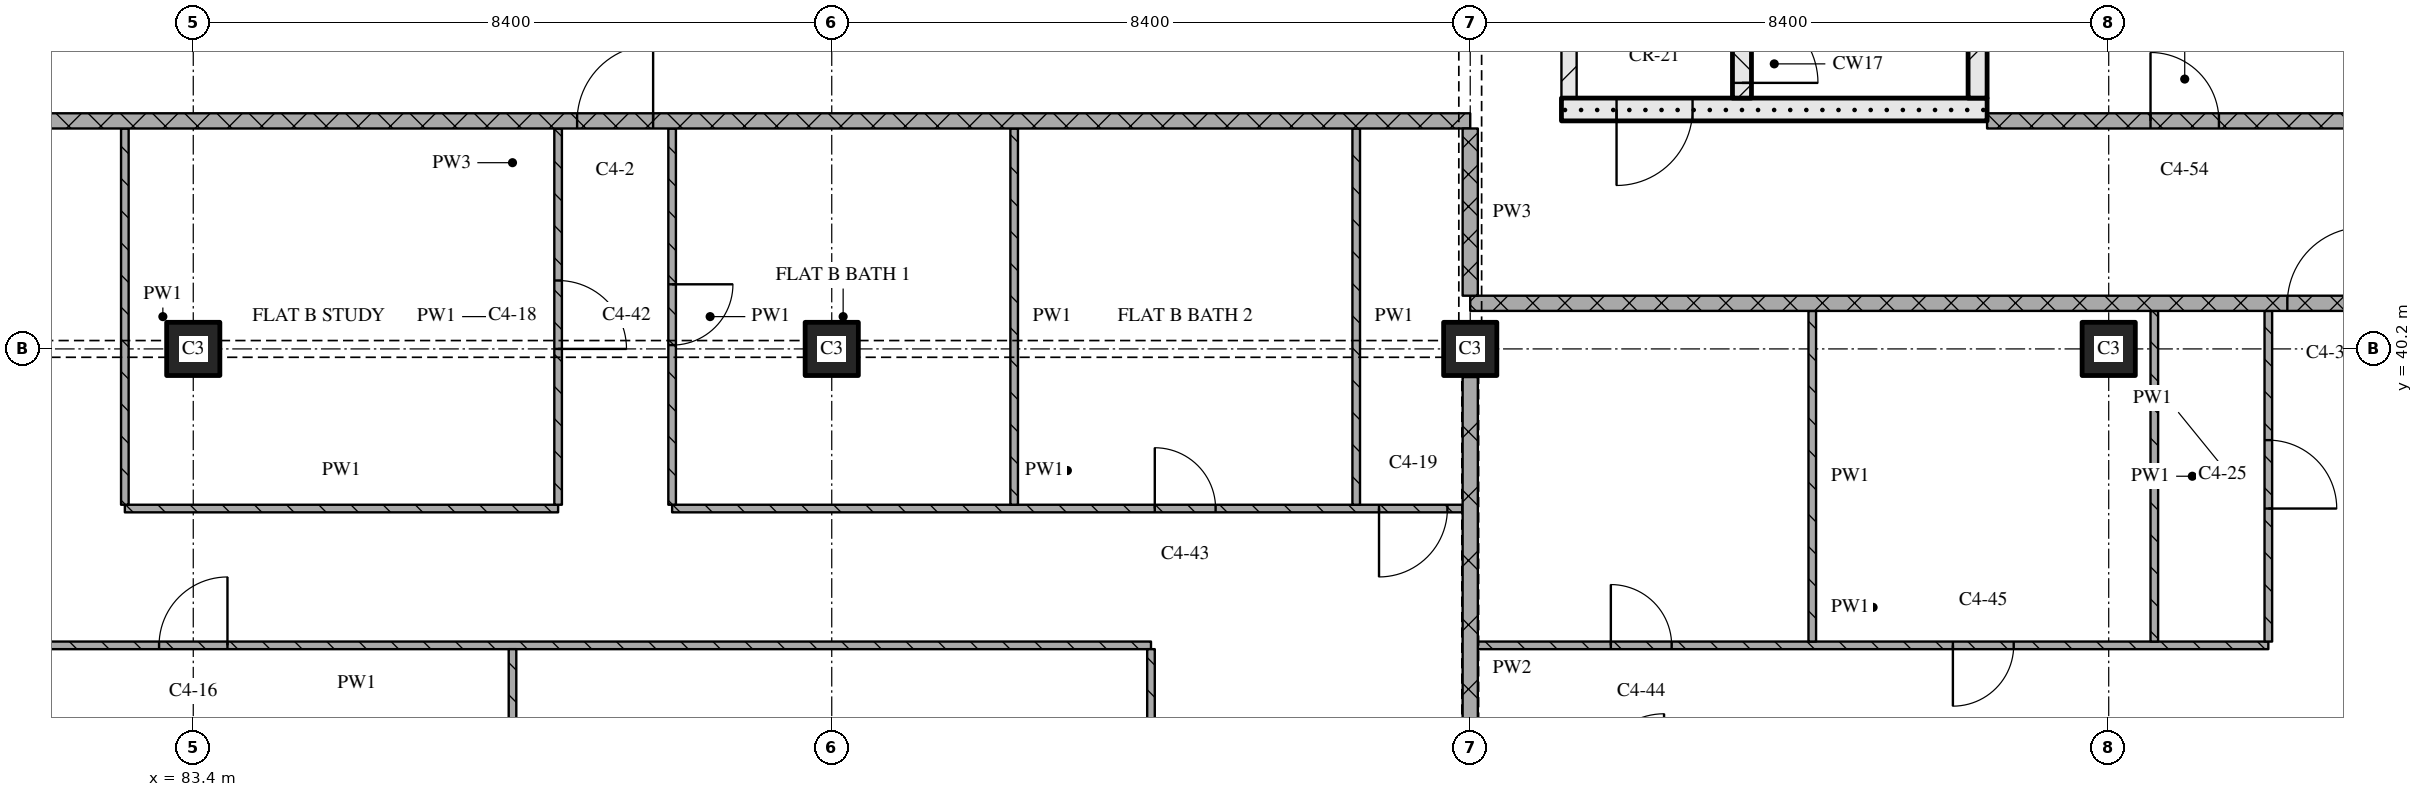
"""IFC4 building model, lengths in metres.
Left out: names, types, materials, properties, quantities, classifications, styles, units other than length and angle.
Written with IfcOpenShell. Run it as: python <this file> out.ifc"""

import sys

from ifc_helpers import new_model, si_unit, direction, frame, frame_2d, origin, origin_2d, place, context, subcontext, project, spatial, rectangle, extrude, element, fill, save


model = new_model("IFC4")
c1 = context("Model", 3, precision=1e-05, world=origin(), true_north=direction((0.0, 1.0)))
c2 = subcontext(c1, "Body", "Model", "MODEL_VIEW")
j1 = project(units=[si_unit("LENGTHUNIT", "METRE"), si_unit("PLANEANGLEUNIT", "RADIAN")], contexts=[c1])
p1 = place(None, origin())
s1 = spatial("IfcSite", under=j1, at=p1, CompositionType="ELEMENT")
p2 = place(p1, origin())
s2 = spatial("IfcBuilding", under=s1, at=p2, CompositionType="ELEMENT")
p3 = place(p2, frame((0.0, 0.0, 187.05)))
s3 = spatial("IfcBuildingStorey", under=s2, at=p3, CompositionType="ELEMENT", Elevation=187.05)
for number, where, z_axis, x_axis in (
    (1, (83.4, 40.2, 0.0), (0.0, 0.0, 1.0), (1.0, 0.0, 0.0)),
    (2, (91.8, 40.2, 0.0), (0.0, 0.0, 1.0), (1.0, 0.0, 0.0)),
    (3, (100.2, 40.2, 0.0), (0.0, 0.0, 1.0), (1.0, 0.0, 0.0)),
    (4, (108.6, 40.2, 0.0), (0.0, 0.0, 1.0), (1.0, 0.0, 0.0)),
):
    element("IfcColumn", number, at=place(p3, frame(where, z_axis=z_axis, x_axis=x_axis)), inside=s3, PredefinedType="COLUMN", context=c2, shape_type="SweptSolid", body=[
        extrude(rectangle(XDim=0.7, YDim=0.7, at=origin_2d()), origin(), (0.0, 0.0, 1.0), 3.6),
    ])
p4 = place(p3, frame((101.4, 43.35, 0.0), z_axis=(0.0, 0.0, 1.0), x_axis=(1.0, 0.0, 0.0)))
e5 = element("IfcWall", 5, at=p4, inside=s3, PredefinedType="SOLIDWALL", context=c2, shape_type="SweptSolid", body=[
    extrude(rectangle(XDim=5.6, YDim=0.3, at=frame_2d((2.8, 0.0))), origin(), (0.0, 0.0, 1.0), 3.32),
])
p5 = place(p4, frame((0.725, 0.0, 0.0)))
e6 = element("IfcOpeningElement", 6, at=p5, cuts=e5, PredefinedType="OPENING", context=c2, shape_type="SweptSolid", body=[
    extrude(rectangle(XDim=1.0, YDim=2.1, at=frame_2d((0.5, 1.05))), frame((0.0, 0.16, 0.0), z_axis=(0.0, -1.0, 0.0), x_axis=(1.0, 0.0, 0.0)), (0.0, 0.0, 1.0), 0.32),
])
p6 = place(p3, frame((101.5, 43.5, 0.0), z_axis=(0.0, 0.0, 1.0), x_axis=(0.0, 1.0, 0.0)))
e7 = element("IfcWall", 7, at=p6, inside=s3, PredefinedType="PARTITIONING", context=c2, shape_type="SweptSolid", body=[
    extrude(rectangle(XDim=6.9, YDim=0.2, at=frame_2d((3.45, 0.0))), origin(), (0.0, 0.0, 1.0), 3.32),
])
p7 = place(p6, frame((1.0, 0.0, 0.0)))
e8 = element("IfcOpeningElement", 8, at=p7, cuts=e7, PredefinedType="OPENING", context=c2, shape_type="SweptSolid", body=[
    extrude(rectangle(XDim=1.0, YDim=2.1, at=frame_2d((0.5, 1.05))), frame((0.0, 0.11, 0.0), z_axis=(0.0, -1.0, 0.0), x_axis=(1.0, 0.0, 0.0)), (0.0, 0.0, 1.0), 0.22),
])
p8 = place(p3, frame((103.775, 43.5, 0.0), z_axis=(0.0, 0.0, 1.0), x_axis=(0.0, 1.0, 0.0)))
e9 = element("IfcWall", 9, at=p8, inside=s3, PredefinedType="SOLIDWALL", context=c2, shape_type="SweptSolid", body=[
    extrude(rectangle(XDim=6.9, YDim=0.25, at=frame_2d((3.45, 0.0))), origin(), (0.0, 0.0, 1.0), 3.32),
])
p9 = place(p8, frame((0.2, 0.0, 0.0)))
e10 = element("IfcOpeningElement", 10, at=p9, cuts=e9, PredefinedType="OPENING", context=c2, shape_type="SweptSolid", body=[
    extrude(rectangle(XDim=1.0, YDim=2.1, at=frame_2d((0.5, 1.05))), frame((0.0, 0.135, 0.0), z_axis=(0.0, -1.0, 0.0), x_axis=(1.0, 0.0, 0.0)), (0.0, 0.0, 1.0), 0.27),
])
p10 = place(p3, frame((106.875, 43.5, 0.0), z_axis=(0.0, 0.0, 1.0), x_axis=(0.0, 1.0, 0.0)))
e11 = element("IfcWall", 11, at=p10, inside=s3, PredefinedType="SOLIDWALL", context=c2, shape_type="SweptSolid", body=[
    extrude(rectangle(XDim=6.9, YDim=0.25, at=frame_2d((3.45, 0.0))), origin(), (0.0, 0.0, 1.0), 3.32),
])
p11 = place(p3, frame((96.0, 36.3, 0.0), z_axis=(0.0, 0.0, 1.0), x_axis=(-1.0, 0.0, 0.0)))
e12 = element("IfcWall", 12, at=p11, inside=s3, PredefinedType="PARTITIONING", context=c2, shape_type="SweptSolid", body=[
    extrude(rectangle(XDim=20.9, YDim=0.1, at=frame_2d((10.45, 0.0))), origin(), (0.0, 0.0, 1.0), 3.32),
])
p12 = place(p11, frame((12.15, 0.0, 0.0)))
e13 = element("IfcOpeningElement", 13, at=p12, cuts=e12, PredefinedType="OPENING", context=c2, shape_type="SweptSolid", body=[
    extrude(rectangle(XDim=0.9, YDim=2.1, at=frame_2d((0.45, 1.05))), frame((0.0, 0.06, 0.0), z_axis=(0.0, -1.0, 0.0), x_axis=(1.0, 0.0, 0.0)), (0.0, 0.0, 1.0), 0.12),
])
p13 = place(p11, frame((18.45, 0.0, 0.0)))
e14 = element("IfcOpeningElement", 14, at=p13, cuts=e12, PredefinedType="OPENING", context=c2, shape_type="SweptSolid", body=[
    extrude(rectangle(XDim=0.9, YDim=2.1, at=frame_2d((0.45, 1.05))), frame((0.0, 0.06, 0.0), z_axis=(0.0, -1.0, 0.0), x_axis=(1.0, 0.0, 0.0)), (0.0, 0.0, 1.0), 0.12),
])
p14 = place(p3, frame((100.3, 36.3, 0.0), z_axis=(0.0, 0.0, 1.0), x_axis=(1.0, 0.0, 0.0)))
e15 = element("IfcWall", 15, at=p14, inside=s3, PredefinedType="PARTITIONING", context=c2, shape_type="SweptSolid", body=[
    extrude(rectangle(XDim=10.4, YDim=0.1, at=frame_2d((5.2, 0.0))), origin(), (0.0, 0.0, 1.0), 3.32),
])
p15 = place(p14, frame((1.75, 0.0, 0.0)))
e16 = element("IfcOpeningElement", 16, at=p15, cuts=e15, PredefinedType="OPENING", context=c2, shape_type="SweptSolid", body=[
    extrude(rectangle(XDim=0.8, YDim=2.1, at=frame_2d((0.4, 1.05))), frame((0.0, 0.06, 0.0), z_axis=(0.0, -1.0, 0.0), x_axis=(1.0, 0.0, 0.0)), (0.0, 0.0, 1.0), 0.12),
])
p16 = place(p14, frame((6.25, 0.0, 0.0)))
e17 = element("IfcOpeningElement", 17, at=p16, cuts=e15, PredefinedType="OPENING", context=c2, shape_type="SweptSolid", body=[
    extrude(rectangle(XDim=0.8, YDim=2.1, at=frame_2d((0.4, 1.05))), frame((0.0, 0.06, 0.0), z_axis=(0.0, -1.0, 0.0), x_axis=(1.0, 0.0, 0.0)), (0.0, 0.0, 1.0), 0.12),
])
p17 = place(p3, frame((82.5, 38.1, 0.0), z_axis=(0.0, 0.0, 1.0), x_axis=(1.0, 0.0, 0.0)))
e18 = element("IfcWall", 18, at=p17, inside=s3, PredefinedType="PARTITIONING", context=c2, shape_type="SweptSolid", body=[
    extrude(rectangle(XDim=5.7, YDim=0.1, at=frame_2d((2.85, 0.0))), origin(), (0.0, 0.0, 1.0), 3.32),
])
p18 = place(p3, frame((89.7, 38.1, 0.0), z_axis=(0.0, 0.0, 1.0), x_axis=(1.0, 0.0, 0.0)))
e19 = element("IfcWall", 19, at=p18, inside=s3, PredefinedType="PARTITIONING", context=c2, shape_type="SweptSolid", body=[
    extrude(rectangle(XDim=10.4, YDim=0.1, at=frame_2d((5.2, 0.0))), origin(), (0.0, 0.0, 1.0), 3.32),
])
p19 = place(p18, frame((6.35, 0.0, 0.0)))
e20 = element("IfcOpeningElement", 20, at=p19, cuts=e19, PredefinedType="OPENING", context=c2, shape_type="SweptSolid", body=[
    extrude(rectangle(XDim=0.8, YDim=2.1, at=frame_2d((0.4, 1.05))), frame((0.0, 0.06, 0.0), z_axis=(0.0, -1.0, 0.0), x_axis=(1.0, 0.0, 0.0)), (0.0, 0.0, 1.0), 0.12),
])
p20 = place(p18, frame((9.3, 0.0, 0.0)))
e21 = element("IfcOpeningElement", 21, at=p20, cuts=e19, PredefinedType="OPENING", context=c2, shape_type="SweptSolid", body=[
    extrude(rectangle(XDim=0.9, YDim=2.1, at=frame_2d((0.45, 1.05))), frame((0.0, 0.06, 0.0), z_axis=(0.0, -1.0, 0.0), x_axis=(1.0, 0.0, 0.0)), (0.0, 0.0, 1.0), 0.12),
])
p21 = place(p3, frame((124.48, 40.8, 0.0), z_axis=(0.0, 0.0, 1.0), x_axis=(-1.0, 0.0, 0.0)))
e22 = element("IfcWall", 22, at=p21, inside=s3, PredefinedType="PARTITIONING", context=c2, shape_type="SweptSolid", body=[
    extrude(rectangle(XDim=24.28, YDim=0.2, at=frame_2d((12.14, 0.0))), origin(), (0.0, 0.0, 1.0), 3.32),
])
p22 = place(p21, frame((12.53, 0.0, 0.0)))
e23 = element("IfcOpeningElement", 23, at=p22, cuts=e22, PredefinedType="OPENING", context=c2, shape_type="SweptSolid", body=[
    extrude(rectangle(XDim=1.0, YDim=2.1, at=frame_2d((0.5, 1.05))), frame((0.0, 0.11, 0.0), z_axis=(0.0, -1.0, 0.0), x_axis=(1.0, 0.0, 0.0)), (0.0, 0.0, 1.0), 0.22),
])
p23 = place(p3, frame((100.2, 43.2, 0.0), z_axis=(0.0, 0.0, 1.0), x_axis=(-1.0, 0.0, 0.0)))
e24 = element("IfcWall", 24, at=p23, inside=s3, PredefinedType="PARTITIONING", context=c2, shape_type="SweptSolid", body=[
    extrude(rectangle(XDim=25.2, YDim=0.2, at=frame_2d((12.6, 0.0))), origin(), (0.0, 0.0, 1.0), 3.32),
])
p24 = place(p23, frame((10.75, 0.0, 0.0)))
e25 = element("IfcOpeningElement", 25, at=p24, cuts=e24, PredefinedType="OPENING", context=c2, shape_type="SweptSolid", body=[
    extrude(rectangle(XDim=1.0, YDim=2.1, at=frame_2d((0.5, 1.05))), frame((0.0, 0.11, 0.0), z_axis=(0.0, -1.0, 0.0), x_axis=(1.0, 0.0, 0.0)), (0.0, 0.0, 1.0), 0.22),
])
p25 = place(p3, frame((107.0, 43.2, 0.0), z_axis=(0.0, 0.0, 1.0), x_axis=(1.0, 0.0, 0.0)))
e26 = element("IfcWall", 26, at=p25, inside=s3, PredefinedType="PARTITIONING", context=c2, shape_type="SweptSolid", body=[
    extrude(rectangle(XDim=5.2, YDim=0.2, at=frame_2d((2.6, 0.0))), origin(), (0.0, 0.0, 1.0), 3.32),
])
p26 = place(p25, frame((2.15, 0.0, 0.0)))
e27 = element("IfcOpeningElement", 27, at=p26, cuts=e26, PredefinedType="OPENING", context=c2, shape_type="SweptSolid", body=[
    extrude(rectangle(XDim=0.9, YDim=2.1, at=frame_2d((0.45, 1.05))), frame((0.0, 0.11, 0.0), z_axis=(0.0, -1.0, 0.0), x_axis=(1.0, 0.0, 0.0)), (0.0, 0.0, 1.0), 0.22),
])
p27 = place(p3, frame((82.5, 43.1, 0.0), z_axis=(0.0, 0.0, 1.0), x_axis=(0.0, -1.0, 0.0)))
e28 = element("IfcWall", 28, at=p27, inside=s3, PredefinedType="PARTITIONING", context=c2, shape_type="SweptSolid", body=[
    extrude(rectangle(XDim=4.95, YDim=0.1, at=frame_2d((2.475, 0.0))), origin(), (0.0, 0.0, 1.0), 3.32),
])
p28 = place(p3, frame((87.6, 36.25, 0.0), z_axis=(0.0, 0.0, 1.0), x_axis=(0.0, -1.0, 0.0)))
e29 = element("IfcWall", 29, at=p28, inside=s3, PredefinedType="PARTITIONING", context=c2, shape_type="SweptSolid", body=[
    extrude(rectangle(XDim=5.97, YDim=0.1, at=frame_2d((2.985, 0.0))), origin(), (0.0, 0.0, 1.0), 3.32),
])
p29 = place(p3, frame((88.2, 38.15, 0.0), z_axis=(0.0, 0.0, 1.0), x_axis=(0.0, 1.0, 0.0)))
e30 = element("IfcWall", 30, at=p29, inside=s3, PredefinedType="PARTITIONING", context=c2, shape_type="SweptSolid", body=[
    extrude(rectangle(XDim=4.95, YDim=0.1, at=frame_2d((2.475, 0.0))), origin(), (0.0, 0.0, 1.0), 3.32),
])
p30 = place(p29, frame((2.05, 0.0, 0.0)))
e31 = element("IfcOpeningElement", 31, at=p30, cuts=e30, PredefinedType="OPENING", context=c2, shape_type="SweptSolid", body=[
    extrude(rectangle(XDim=0.9, YDim=2.1, at=frame_2d((0.45, 1.05))), frame((0.0, 0.06, 0.0), z_axis=(0.0, -1.0, 0.0), x_axis=(1.0, 0.0, 0.0)), (0.0, 0.0, 1.0), 0.12),
])
p31 = place(p3, frame((89.7, 43.1, 0.0), z_axis=(0.0, 0.0, 1.0), x_axis=(0.0, -1.0, 0.0)))
e32 = element("IfcWall", 32, at=p31, inside=s3, PredefinedType="PARTITIONING", context=c2, shape_type="SweptSolid", body=[
    extrude(rectangle(XDim=4.95, YDim=0.1, at=frame_2d((2.475, 0.0))), origin(), (0.0, 0.0, 1.0), 3.32),
])
p32 = place(p31, frame((2.05, 0.0, 0.0)))
e33 = element("IfcOpeningElement", 33, at=p32, cuts=e32, PredefinedType="OPENING", context=c2, shape_type="SweptSolid", body=[
    extrude(rectangle(XDim=0.8, YDim=2.1, at=frame_2d((0.4, 1.05))), frame((0.0, 0.06, 0.0), z_axis=(0.0, -1.0, 0.0), x_axis=(1.0, 0.0, 0.0)), (0.0, 0.0, 1.0), 0.12),
])
p33 = place(p3, frame((94.2, 43.1, 0.0), z_axis=(0.0, 0.0, 1.0), x_axis=(0.0, -1.0, 0.0)))
e34 = element("IfcWall", 34, at=p33, inside=s3, PredefinedType="PARTITIONING", context=c2, shape_type="SweptSolid", body=[
    extrude(rectangle(XDim=4.95, YDim=0.1, at=frame_2d((2.475, 0.0))), origin(), (0.0, 0.0, 1.0), 3.32),
])
p34 = place(p3, frame((96.0, 30.28, 0.0), z_axis=(0.0, 0.0, 1.0), x_axis=(0.0, 1.0, 0.0)))
e35 = element("IfcWall", 35, at=p34, inside=s3, PredefinedType="PARTITIONING", context=c2, shape_type="SweptSolid", body=[
    extrude(rectangle(XDim=5.97, YDim=0.1, at=frame_2d((2.985, 0.0))), origin(), (0.0, 0.0, 1.0), 3.32),
])
p35 = place(p34, frame((2.42, 0.0, 0.0)))
e36 = element("IfcOpeningElement", 36, at=p35, cuts=e35, PredefinedType="OPENING", context=c2, shape_type="SweptSolid", body=[
    extrude(rectangle(XDim=0.9, YDim=2.1, at=frame_2d((0.45, 1.05))), frame((0.0, 0.06, 0.0), z_axis=(0.0, -1.0, 0.0), x_axis=(1.0, 0.0, 0.0)), (0.0, 0.0, 1.0), 0.12),
])
p36 = place(p3, frame((98.7, 43.1, 0.0), z_axis=(0.0, 0.0, 1.0), x_axis=(0.0, -1.0, 0.0)))
e37 = element("IfcWall", 37, at=p36, inside=s3, PredefinedType="PARTITIONING", context=c2, shape_type="SweptSolid", body=[
    extrude(rectangle(XDim=4.95, YDim=0.1, at=frame_2d((2.475, 0.0))), origin(), (0.0, 0.0, 1.0), 3.32),
])
p37 = place(p3, frame((100.2, 43.1, 0.0), z_axis=(0.0, 0.0, 1.0), x_axis=(0.0, -1.0, 0.0)))
e38 = element("IfcWall", 38, at=p37, inside=s3, PredefinedType="PARTITIONING", context=c2, shape_type="SweptSolid", body=[
    extrude(rectangle(XDim=2.2, YDim=0.2, at=frame_2d((1.1, 0.0))), origin(), (0.0, 0.0, 1.0), 2.43),
])
p38 = place(p3, frame((100.2, 39.83, 0.0), z_axis=(0.0, 0.0, 1.0), x_axis=(0.0, -1.0, 0.0)))
e39 = element("IfcWall", 39, at=p38, inside=s3, PredefinedType="PARTITIONING", context=c2, shape_type="SweptSolid", body=[
    extrude(rectangle(XDim=7.66, YDim=0.2, at=frame_2d((3.83, 0.0))), origin(), (0.0, 0.0, 1.0), 2.72),
])
for number, where, z_axis, x_axis in (
    (40, (104.7, 40.7, 0.0), (0.0, 0.0, 1.0), (0.0, -1.0, 0.0)),
    (41, (109.2, 40.7, 0.0), (0.0, 0.0, 1.0), (0.0, -1.0, 0.0)),
):
    element("IfcWall", number, at=place(p3, frame(where, z_axis=z_axis, x_axis=x_axis)), inside=s3, PredefinedType="PARTITIONING", context=c2, shape_type="SweptSolid", body=[
        extrude(rectangle(XDim=4.35, YDim=0.1, at=frame_2d((2.175, 0.0))), origin(), (0.0, 0.0, 1.0), 3.32),
    ])
p39 = place(p3, frame((110.7, 36.35, 0.0), z_axis=(0.0, 0.0, 1.0), x_axis=(0.0, 1.0, 0.0)))
e42 = element("IfcWall", 42, at=p39, inside=s3, PredefinedType="PARTITIONING", context=c2, shape_type="SweptSolid", body=[
    extrude(rectangle(XDim=4.35, YDim=0.1, at=frame_2d((2.175, 0.0))), origin(), (0.0, 0.0, 1.0), 3.32),
])
p40 = place(p39, frame((1.75, 0.0, 0.0)))
e43 = element("IfcOpeningElement", 43, at=p40, cuts=e42, PredefinedType="OPENING", context=c2, shape_type="SweptSolid", body=[
    extrude(rectangle(XDim=0.9, YDim=2.1, at=frame_2d((0.45, 1.05))), frame((0.0, 0.06, 0.0), z_axis=(0.0, -1.0, 0.0), x_axis=(1.0, 0.0, 0.0)), (0.0, 0.0, 1.0), 0.12),
])
p41 = place(p5, origin())
e44 = element("IfcDoor", 44, at=p41, inside=s3, OperationType="SINGLE_SWING_RIGHT", PredefinedType="DOOR", context=c2, shape_type="SweptSolid", body=[
    extrude(rectangle(XDim=1.0, YDim=2.1, at=frame_2d((0.5, 1.05))), frame((0.0, 0.025, 0.0), z_axis=(0.0, -1.0, 0.0), x_axis=(1.0, 0.0, 0.0)), (0.0, 0.0, 1.0), 0.05),
])
fill(e6, e44)
p42 = place(p9, origin())
e45 = element("IfcDoor", 45, at=p42, inside=s3, OperationType="SINGLE_SWING_RIGHT", PredefinedType="DOOR", context=c2, shape_type="SweptSolid", body=[
    extrude(rectangle(XDim=1.0, YDim=2.1, at=frame_2d((0.5, 1.05))), frame((0.0, 0.025, 0.0), z_axis=(0.0, -1.0, 0.0), x_axis=(1.0, 0.0, 0.0)), (0.0, 0.0, 1.0), 0.05),
])
fill(e10, e45)
p43 = place(p12, origin())
e46 = element("IfcDoor", 46, at=p43, inside=s3, OperationType="SINGLE_SWING_RIGHT", PredefinedType="DOOR", context=c2, shape_type="SweptSolid", body=[
    extrude(rectangle(XDim=0.9, YDim=2.1, at=frame_2d((0.45, 1.05))), frame((0.0, 0.025, 0.0), z_axis=(0.0, -1.0, 0.0), x_axis=(1.0, 0.0, 0.0)), (0.0, 0.0, 1.0), 0.05),
])
fill(e13, e46)
p44 = place(p15, origin())
e47 = element("IfcDoor", 47, at=p44, inside=s3, OperationType="SINGLE_SWING_LEFT", PredefinedType="DOOR", context=c2, shape_type="SweptSolid", body=[
    extrude(rectangle(XDim=0.8, YDim=2.1, at=frame_2d((0.4, 1.05))), frame((0.0, 0.025, 0.0), z_axis=(0.0, -1.0, 0.0), x_axis=(1.0, 0.0, 0.0)), (0.0, 0.0, 1.0), 0.05),
])
fill(e16, e47)
p45 = place(p16, origin())
e48 = element("IfcDoor", 48, at=p45, inside=s3, OperationType="SINGLE_SWING_RIGHT", PredefinedType="DOOR", context=c2, shape_type="SweptSolid", body=[
    extrude(rectangle(XDim=0.8, YDim=2.1, at=frame_2d((0.4, 1.05))), frame((0.0, 0.025, 0.0), z_axis=(0.0, -1.0, 0.0), x_axis=(1.0, 0.0, 0.0)), (0.0, 0.0, 1.0), 0.05),
])
fill(e17, e48)
p46 = place(p19, origin())
e49 = element("IfcDoor", 49, at=p46, inside=s3, OperationType="SINGLE_SWING_LEFT", PredefinedType="DOOR", context=c2, shape_type="SweptSolid", body=[
    extrude(rectangle(XDim=0.8, YDim=2.1, at=frame_2d((0.4, 1.05))), frame((0.0, 0.025, 0.0), z_axis=(0.0, -1.0, 0.0), x_axis=(1.0, 0.0, 0.0)), (0.0, 0.0, 1.0), 0.05),
])
fill(e20, e49)
p47 = place(p20, origin())
e50 = element("IfcDoor", 50, at=p47, inside=s3, OperationType="SINGLE_SWING_RIGHT", PredefinedType="DOOR", context=c2, shape_type="SweptSolid", body=[
    extrude(rectangle(XDim=0.9, YDim=2.1, at=frame_2d((0.45, 1.05))), frame((0.0, 0.025, 0.0), z_axis=(0.0, -1.0, 0.0), x_axis=(1.0, 0.0, 0.0)), (0.0, 0.0, 1.0), 0.05),
])
fill(e21, e50)
p48 = place(p22, origin())
e51 = element("IfcDoor", 51, at=p48, inside=s3, OperationType="SINGLE_SWING_RIGHT", PredefinedType="DOOR", context=c2, shape_type="SweptSolid", body=[
    extrude(rectangle(XDim=1.0, YDim=2.1, at=frame_2d((0.5, 1.05))), frame((0.0, 0.025, 0.0), z_axis=(0.0, -1.0, 0.0), x_axis=(1.0, 0.0, 0.0)), (0.0, 0.0, 1.0), 0.05),
])
fill(e23, e51)
p49 = place(p24, origin())
e52 = element("IfcDoor", 52, at=p49, inside=s3, OperationType="SINGLE_SWING_RIGHT", PredefinedType="DOOR", context=c2, shape_type="SweptSolid", body=[
    extrude(rectangle(XDim=1.0, YDim=2.1, at=frame_2d((0.5, 1.05))), frame((0.0, 0.025, 0.0), z_axis=(0.0, -1.0, 0.0), x_axis=(1.0, 0.0, 0.0)), (0.0, 0.0, 1.0), 0.05),
])
fill(e25, e52)
p50 = place(p26, origin())
e53 = element("IfcDoor", 53, at=p50, inside=s3, OperationType="SINGLE_SWING_LEFT", PredefinedType="DOOR", context=c2, shape_type="SweptSolid", body=[
    extrude(rectangle(XDim=0.9, YDim=2.1, at=frame_2d((0.45, 1.05))), frame((0.0, 0.025, 0.0), z_axis=(0.0, -1.0, 0.0), x_axis=(1.0, 0.0, 0.0)), (0.0, 0.0, 1.0), 0.05),
])
fill(e27, e53)
p51 = place(p30, origin())
e54 = element("IfcDoor", 54, at=p51, inside=s3, OperationType="SINGLE_SWING_RIGHT", PredefinedType="DOOR", context=c2, shape_type="SweptSolid", body=[
    extrude(rectangle(XDim=0.9, YDim=2.1, at=frame_2d((0.45, 1.05))), frame((0.0, 0.025, 0.0), z_axis=(0.0, -1.0, 0.0), x_axis=(1.0, 0.0, 0.0)), (0.0, 0.0, 1.0), 0.05),
])
fill(e31, e54)
p52 = place(p32, origin())
e55 = element("IfcDoor", 55, at=p52, inside=s3, OperationType="SINGLE_SWING_LEFT", PredefinedType="DOOR", context=c2, shape_type="SweptSolid", body=[
    extrude(rectangle(XDim=0.8, YDim=2.1, at=frame_2d((0.4, 1.05))), frame((0.0, 0.025, 0.0), z_axis=(0.0, -1.0, 0.0), x_axis=(1.0, 0.0, 0.0)), (0.0, 0.0, 1.0), 0.05),
])
fill(e33, e55)
p53 = place(p40, origin())
e56 = element("IfcDoor", 56, at=p53, inside=s3, OperationType="SINGLE_SWING_RIGHT", PredefinedType="DOOR", context=c2, shape_type="SweptSolid", body=[
    extrude(rectangle(XDim=0.9, YDim=2.1, at=frame_2d((0.45, 1.05))), frame((0.0, 0.025, 0.0), z_axis=(0.0, -1.0, 0.0), x_axis=(1.0, 0.0, 0.0)), (0.0, 0.0, 1.0), 0.05),
])
fill(e43, e56)
save(model, sys.argv[1])
